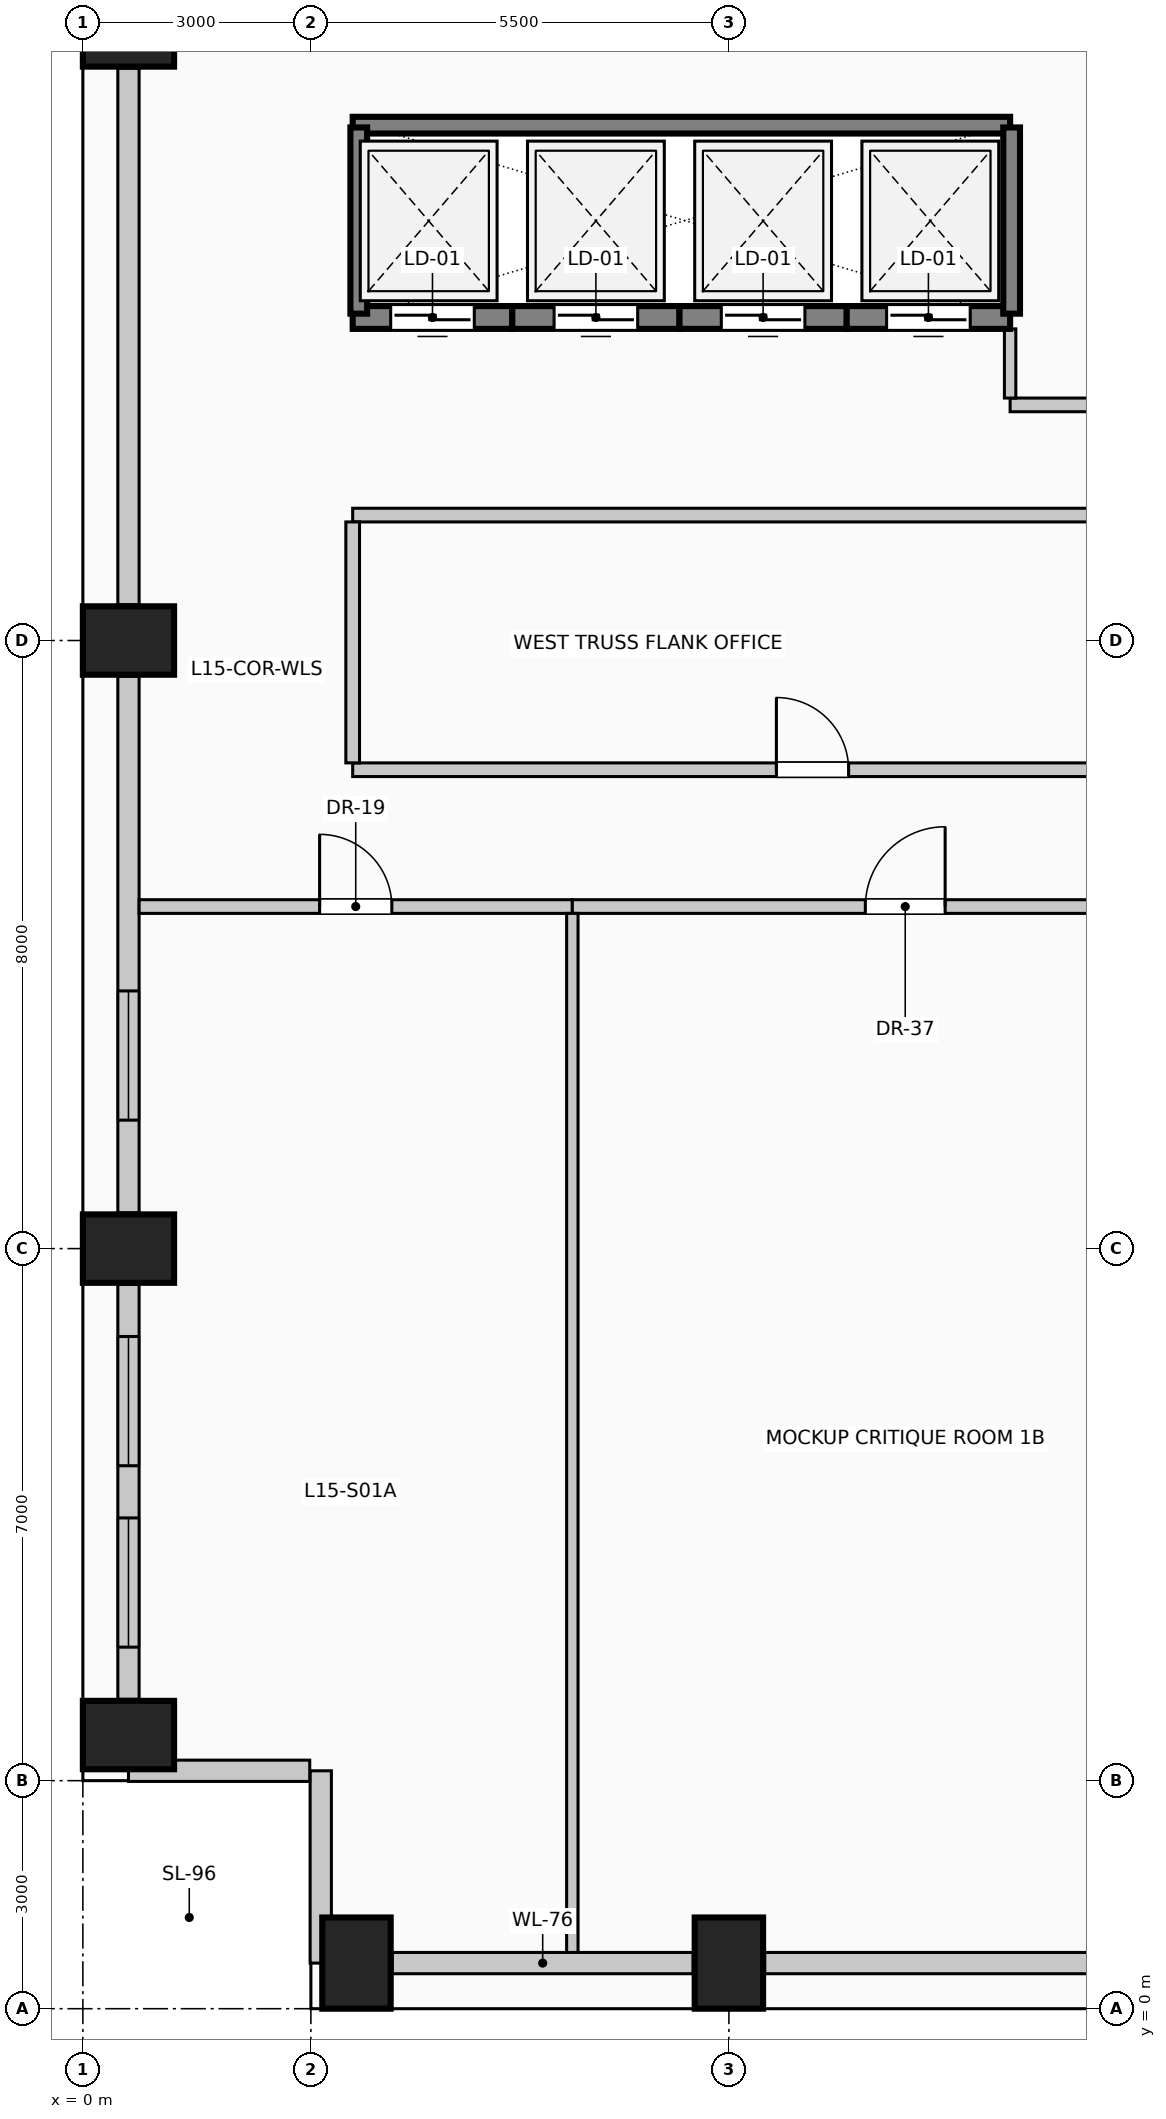
"""IFC4 building model, lengths in metres.
Left out: names, types, materials, properties, quantities, classifications, styles, units other than length and angle.
Written with IfcOpenShell. Run it as: python <this file> out.ifc"""

import sys

from ifc_helpers import new_model, si_unit, direction, frame, frame_2d, origin, origin_2d, place, context, subcontext, project, spatial, rectangle, extrude, element, fill, save


model = new_model("IFC4")
c1 = context("Model", 3, precision=1e-05, world=origin(), true_north=direction((0.0, 1.0)))
c2 = subcontext(c1, "Body", "Model", "MODEL_VIEW")
j1 = project(units=[si_unit("LENGTHUNIT", "METRE"), si_unit("PLANEANGLEUNIT", "RADIAN")], contexts=[c1])
p1 = place(None, origin())
s1 = spatial("IfcSite", under=j1, at=p1, CompositionType="ELEMENT")
p2 = place(p1, origin())
s2 = spatial("IfcBuilding", under=s1, at=p2, CompositionType="ELEMENT")
p3 = place(p2, frame((0.0, 0.0, 62.6)))
s3 = spatial("IfcBuildingStorey", under=s2, at=p3, CompositionType="ELEMENT", Elevation=62.6)
for number, where, z_axis, x_axis in (
    (1, (3.6, 0.6, 0.0), (0.0, 0.0, 1.0), (1.0, 0.0, 0.0)),
    (2, (8.5, 0.6, 0.0), (0.0, 0.0, 1.0), (1.0, 0.0, 0.0)),
    (3, (0.6, 3.6, 0.0), (0.0, 0.0, 1.0), (0.0, 1.0, 0.0)),
    (4, (0.6, 10.0, 0.0), (0.0, 0.0, 1.0), (0.0, 1.0, 0.0)),
    (5, (0.6, 18.0, 0.0), (0.0, 0.0, 1.0), (0.0, 1.0, 0.0)),
    (6, (0.6, 26.0, 0.0), (0.0, 0.0, 1.0), (0.0, 1.0, 0.0)),
):
    element("IfcColumn", number, at=place(p3, frame(where, z_axis=z_axis, x_axis=x_axis)), inside=s3, PredefinedType="COLUMN", context=c2, shape_type="SweptSolid", body=[
        extrude(rectangle(XDim=0.9, YDim=1.2, at=origin_2d()), origin(), (0.0, 0.0, 1.0), 4.0),
    ])
p4 = place(p3, frame((8.03, 0.6, 0.0), z_axis=(0.0, 0.0, 1.0), x_axis=(-1.0, 0.0, 0.0)))
e7 = element("IfcWall", 7, at=p4, inside=s3, PredefinedType="SOLIDWALL", context=c2, shape_type="SweptSolid", body=[
    extrude(rectangle(XDim=3.96, YDim=0.28, at=frame_2d((1.98, 0.0))), origin(), (0.0, 0.0, 1.0), 2.85),
])
p5 = place(p3, frame((13.53, 0.6, 0.0), z_axis=(0.0, 0.0, 1.0), x_axis=(-1.0, 0.0, 0.0)))
e8 = element("IfcWall", 8, at=p5, inside=s3, PredefinedType="SOLIDWALL", context=c2, shape_type="SweptSolid", body=[
    extrude(rectangle(XDim=4.56, YDim=0.28, at=frame_2d((2.28, 0.0))), origin(), (0.0, 0.0, 1.0), 2.85),
])
p6 = place(p3, frame((0.6, 4.07, 0.0), z_axis=(0.0, 0.0, 1.0), x_axis=(0.0, 1.0, 0.0)))
e9 = element("IfcWall", 9, at=p6, inside=s3, PredefinedType="SOLIDWALL", context=c2, shape_type="SweptSolid", body=[
    extrude(rectangle(XDim=5.46, YDim=0.28, at=frame_2d((2.73, 0.0))), origin(), (0.0, 0.0, 1.0), 2.85),
])
p7 = place(p6, frame((0.687, 0.0, 0.5)))
e10 = element("IfcOpeningElement", 10, at=p7, cuts=e9, PredefinedType="OPENING", context=c2, shape_type="SweptSolid", body=[
    extrude(rectangle(XDim=1.7, YDim=1.95, at=frame_2d((0.85, 0.975))), frame((0.0, 0.15, 0.0), z_axis=(0.0, -1.0, 0.0), x_axis=(1.0, 0.0, 0.0)), (0.0, 0.0, 1.0), 0.3),
])
p8 = place(p6, frame((3.073, 0.0, 0.5)))
e11 = element("IfcOpeningElement", 11, at=p8, cuts=e9, PredefinedType="OPENING", context=c2, shape_type="SweptSolid", body=[
    extrude(rectangle(XDim=1.7, YDim=1.95, at=frame_2d((0.85, 0.975))), frame((0.0, 0.15, 0.0), z_axis=(0.0, -1.0, 0.0), x_axis=(1.0, 0.0, 0.0)), (0.0, 0.0, 1.0), 0.3),
])
p9 = place(p3, frame((0.6, 10.47, 0.0), z_axis=(0.0, 0.0, 1.0), x_axis=(0.0, 1.0, 0.0)))
e12 = element("IfcWall", 12, at=p9, inside=s3, PredefinedType="SOLIDWALL", context=c2, shape_type="SweptSolid", body=[
    extrude(rectangle(XDim=7.06, YDim=0.28, at=frame_2d((3.53, 0.0))), origin(), (0.0, 0.0, 1.0), 2.85),
])
p10 = place(p9, frame((1.22, 0.0, 0.5)))
e13 = element("IfcOpeningElement", 13, at=p10, cuts=e12, PredefinedType="OPENING", context=c2, shape_type="SweptSolid", body=[
    extrude(rectangle(XDim=1.7, YDim=1.95, at=frame_2d((0.85, 0.975))), frame((0.0, 0.15, 0.0), z_axis=(0.0, -1.0, 0.0), x_axis=(1.0, 0.0, 0.0)), (0.0, 0.0, 1.0), 0.3),
])
p11 = place(p3, frame((0.6, 18.47, 0.0), z_axis=(0.0, 0.0, 1.0), x_axis=(0.0, 1.0, 0.0)))
e14 = element("IfcWall", 14, at=p11, inside=s3, PredefinedType="SOLIDWALL", context=c2, shape_type="SweptSolid", body=[
    extrude(rectangle(XDim=7.06, YDim=0.28, at=frame_2d((3.53, 0.0))), origin(), (0.0, 0.0, 1.0), 2.85),
])
p12 = place(p3, frame((3.13, 0.6, 0.0), z_axis=(0.0, 0.0, 1.0), x_axis=(0.0, 1.0, 0.0)))
e15 = element("IfcWall", 15, at=p12, inside=s3, PredefinedType="SOLIDWALL", context=c2, shape_type="SweptSolid", body=[
    extrude(rectangle(XDim=2.53, YDim=0.28, at=frame_2d((1.265, 0.0))), origin(), (0.0, 0.0, 1.0), 3.7),
])
p13 = place(p3, frame((2.985, 3.13, 0.0), z_axis=(0.0, 0.0, 1.0), x_axis=(-1.0, 0.0, 0.0)))
e16 = element("IfcWall", 16, at=p13, inside=s3, PredefinedType="SOLIDWALL", context=c2, shape_type="SweptSolid", body=[
    extrude(rectangle(XDim=2.385, YDim=0.28, at=frame_2d((1.192, 0.0))), origin(), (0.0, 0.0, 1.0), 3.7),
])
p14 = place(p3, frame((5.65, 22.25, 0.0), z_axis=(0.0, 0.0, 1.0), x_axis=(-1.0, 0.0, 0.0)))
e17 = element("IfcWall", 17, at=p14, inside=s3, PredefinedType="SOLIDWALL", context=c2, shape_type="SweptSolid", body=[
    extrude(rectangle(XDim=2.1, YDim=0.3, at=frame_2d((1.05, 0.0))), origin(), (0.0, 0.0, 1.0), 4.0),
])
p15 = place(p14, frame((0.5, 0.0, 0.0)))
e18 = element("IfcOpeningElement", 18, at=p15, cuts=e17, PredefinedType="OPENING", context=c2, shape_type="SweptSolid", body=[
    extrude(rectangle(XDim=1.1, YDim=2.2, at=frame_2d((0.55, 1.1))), frame((0.0, 0.16, 0.0), z_axis=(0.0, -1.0, 0.0), x_axis=(1.0, 0.0, 0.0)), (0.0, 0.0, 1.0), 0.32),
])
p16 = place(p3, frame((7.85, 22.25, 0.0), z_axis=(0.0, 0.0, 1.0), x_axis=(-1.0, 0.0, 0.0)))
e19 = element("IfcWall", 19, at=p16, inside=s3, PredefinedType="SOLIDWALL", context=c2, shape_type="SweptSolid", body=[
    extrude(rectangle(XDim=2.2, YDim=0.3, at=frame_2d((1.1, 0.0))), origin(), (0.0, 0.0, 1.0), 4.0),
])
p17 = place(p16, frame((0.55, 0.0, 0.0)))
e20 = element("IfcOpeningElement", 20, at=p17, cuts=e19, PredefinedType="OPENING", context=c2, shape_type="SweptSolid", body=[
    extrude(rectangle(XDim=1.1, YDim=2.2, at=frame_2d((0.55, 1.1))), frame((0.0, 0.16, 0.0), z_axis=(0.0, -1.0, 0.0), x_axis=(1.0, 0.0, 0.0)), (0.0, 0.0, 1.0), 0.32),
])
p18 = place(p3, frame((10.05, 22.25, 0.0), z_axis=(0.0, 0.0, 1.0), x_axis=(-1.0, 0.0, 0.0)))
e21 = element("IfcWall", 21, at=p18, inside=s3, PredefinedType="SOLIDWALL", context=c2, shape_type="SweptSolid", body=[
    extrude(rectangle(XDim=2.2, YDim=0.3, at=frame_2d((1.1, 0.0))), origin(), (0.0, 0.0, 1.0), 4.0),
])
p19 = place(p18, frame((0.55, 0.0, 0.0)))
e22 = element("IfcOpeningElement", 22, at=p19, cuts=e21, PredefinedType="OPENING", context=c2, shape_type="SweptSolid", body=[
    extrude(rectangle(XDim=1.1, YDim=2.2, at=frame_2d((0.55, 1.1))), frame((0.0, 0.16, 0.0), z_axis=(0.0, -1.0, 0.0), x_axis=(1.0, 0.0, 0.0)), (0.0, 0.0, 1.0), 0.32),
])
p20 = place(p3, frame((12.2, 22.25, 0.0), z_axis=(0.0, 0.0, 1.0), x_axis=(-1.0, 0.0, 0.0)))
e23 = element("IfcWall", 23, at=p20, inside=s3, PredefinedType="SOLIDWALL", context=c2, shape_type="SweptSolid", body=[
    extrude(rectangle(XDim=2.15, YDim=0.3, at=frame_2d((1.075, 0.0))), origin(), (0.0, 0.0, 1.0), 4.0),
])
p21 = place(p20, frame((0.525, 0.0, 0.0)))
e24 = element("IfcOpeningElement", 24, at=p21, cuts=e23, PredefinedType="OPENING", context=c2, shape_type="SweptSolid", body=[
    extrude(rectangle(XDim=1.1, YDim=2.2, at=frame_2d((0.55, 1.1))), frame((0.0, 0.16, 0.0), z_axis=(0.0, -1.0, 0.0), x_axis=(1.0, 0.0, 0.0)), (0.0, 0.0, 1.0), 0.32),
])
p22 = place(p3, frame((3.55, 24.78, 0.0), z_axis=(0.0, 0.0, 1.0), x_axis=(1.0, 0.0, 0.0)))
e25 = element("IfcWall", 25, at=p22, inside=s3, PredefinedType="SOLIDWALL", context=c2, shape_type="SweptSolid", body=[
    extrude(rectangle(XDim=8.65, YDim=0.22, at=frame_2d((4.325, 0.0))), origin(), (0.0, 0.0, 1.0), 4.0),
])
for number, where, z_axis, x_axis in (
    (26, (3.63, 22.3, 0.0), (0.0, 0.0, 1.0), (0.0, 1.0, 0.0)),
    (27, (12.22, 22.3, 0.0), (0.0, 0.0, 1.0), (0.0, 1.0, 0.0)),
):
    element("IfcWall", number, at=place(p3, frame(where, z_axis=z_axis, x_axis=x_axis)), inside=s3, PredefinedType="SOLIDWALL", context=c2, shape_type="SweptSolid", body=[
        extrude(rectangle(XDim=2.45, YDim=0.22, at=frame_2d((1.225, 0.0))), origin(), (0.0, 0.0, 1.0), 4.0),
    ])
p23 = place(p3, frame((0.74, 14.5, 0.0), z_axis=(0.0, 0.0, 1.0), x_axis=(1.0, 0.0, 0.0)))
e28 = element("IfcWall", 28, at=p23, inside=s3, PredefinedType="PARTITIONING", context=c2, shape_type="SweptSolid", body=[
    extrude(rectangle(XDim=5.7, YDim=0.18, at=frame_2d((2.85, 0.0))), origin(), (0.0, 0.0, 1.0), 3.7),
])
p24 = place(p23, frame((2.375, 0.0, 0.0)))
e29 = element("IfcOpeningElement", 29, at=p24, cuts=e28, PredefinedType="OPENING", context=c2, shape_type="SweptSolid", body=[
    extrude(rectangle(XDim=0.95, YDim=2.15, at=frame_2d((0.475, 1.075))), frame((0.0, 0.1, 0.0), z_axis=(0.0, -1.0, 0.0), x_axis=(1.0, 0.0, 0.0)), (0.0, 0.0, 1.0), 0.2),
])
p25 = place(p3, frame((6.44, 14.5, 0.0), z_axis=(0.0, 0.0, 1.0), x_axis=(1.0, 0.0, 0.0)))
e30 = element("IfcWall", 30, at=p25, inside=s3, PredefinedType="PARTITIONING", context=c2, shape_type="SweptSolid", body=[
    extrude(rectangle(XDim=8.76, YDim=0.18, at=frame_2d((4.38, 0.0))), origin(), (0.0, 0.0, 1.0), 3.7),
])
p26 = place(p25, frame((3.855, 0.0, 0.0)))
e31 = element("IfcOpeningElement", 31, at=p26, cuts=e30, PredefinedType="OPENING", context=c2, shape_type="SweptSolid", body=[
    extrude(rectangle(XDim=1.05, YDim=2.15, at=frame_2d((0.525, 1.075))), frame((0.0, 0.1, 0.0), z_axis=(0.0, -1.0, 0.0), x_axis=(1.0, 0.0, 0.0)), (0.0, 0.0, 1.0), 0.2),
])
p27 = place(p3, frame((3.55, 16.3, 0.0), z_axis=(0.0, 0.0, 1.0), x_axis=(1.0, 0.0, 0.0)))
e32 = element("IfcWall", 32, at=p27, inside=s3, PredefinedType="PARTITIONING", context=c2, shape_type="SweptSolid", body=[
    extrude(rectangle(XDim=12.1, YDim=0.18, at=frame_2d((6.05, 0.0))), origin(), (0.0, 0.0, 1.0), 3.7),
])
p28 = place(p27, frame((5.575, 0.0, 0.0)))
e33 = element("IfcOpeningElement", 33, at=p28, cuts=e32, PredefinedType="OPENING", context=c2, shape_type="SweptSolid", body=[
    extrude(rectangle(XDim=0.95, YDim=2.15, at=frame_2d((0.475, 1.075))), frame((0.0, 0.1, 0.0), z_axis=(0.0, -1.0, 0.0), x_axis=(1.0, 0.0, 0.0)), (0.0, 0.0, 1.0), 0.2),
])
p29 = place(p3, frame((3.55, 19.65, 0.0), z_axis=(0.0, 0.0, 1.0), x_axis=(1.0, 0.0, 0.0)))
e34 = element("IfcWall", 34, at=p29, inside=s3, PredefinedType="PARTITIONING", context=c2, shape_type="SweptSolid", body=[
    extrude(rectangle(XDim=12.1, YDim=0.18, at=frame_2d((6.05, 0.0))), origin(), (0.0, 0.0, 1.0), 3.7),
])
p30 = place(p3, frame((12.2, 21.1, 0.0), z_axis=(0.0, 0.0, 1.0), x_axis=(1.0, 0.0, 0.0)))
e35 = element("IfcWall", 35, at=p30, inside=s3, PredefinedType="PARTITIONING", context=c2, shape_type="SweptSolid", body=[
    extrude(rectangle(XDim=4.45, YDim=0.18, at=frame_2d((2.225, 0.0))), origin(), (0.0, 0.0, 1.0), 3.7),
])
p31 = place(p3, frame((3.55, 16.39, 0.0), z_axis=(0.0, 0.0, 1.0), x_axis=(0.0, 1.0, 0.0)))
e36 = element("IfcWall", 36, at=p31, inside=s3, PredefinedType="PARTITIONING", context=c2, shape_type="SweptSolid", body=[
    extrude(rectangle(XDim=3.17, YDim=0.18, at=frame_2d((1.585, 0.0))), origin(), (0.0, 0.0, 1.0), 3.7),
])
p32 = place(p3, frame((6.44, 0.74, 0.0), z_axis=(0.0, 0.0, 1.0), x_axis=(0.0, 1.0, 0.0)))
e37 = element("IfcWall", 37, at=p32, inside=s3, PredefinedType="PARTITIONING", context=c2, shape_type="SweptSolid", body=[
    extrude(rectangle(XDim=13.67, YDim=0.15, at=frame_2d((6.835, 0.0))), origin(), (0.0, 0.0, 1.0), 3.7),
])
p33 = place(p3, frame((12.2, 21.19, 0.0), z_axis=(0.0, 0.0, 1.0), x_axis=(0.0, 1.0, 0.0)))
e38 = element("IfcWall", 38, at=p33, inside=s3, PredefinedType="PARTITIONING", context=c2, shape_type="SweptSolid", body=[
    extrude(rectangle(XDim=0.91, YDim=0.15, at=frame_2d((0.455, 0.0))), origin(), (0.0, 0.0, 1.0), 3.7),
])
p34 = place(p7, origin())
e39 = element("IfcWindow", 39, at=p34, inside=s3, PartitioningType="SINGLE_PANEL", PredefinedType="WINDOW", context=c2, shape_type="SweptSolid", body=[
    extrude(rectangle(XDim=1.7, YDim=1.95, at=frame_2d((0.85, 0.975))), frame((0.0, 0.03, 0.0), z_axis=(0.0, -1.0, 0.0), x_axis=(1.0, 0.0, 0.0)), (0.0, 0.0, 1.0), 0.06),
])
fill(e10, e39)
p35 = place(p8, origin())
e40 = element("IfcWindow", 40, at=p35, inside=s3, PartitioningType="SINGLE_PANEL", PredefinedType="WINDOW", context=c2, shape_type="SweptSolid", body=[
    extrude(rectangle(XDim=1.7, YDim=1.95, at=frame_2d((0.85, 0.975))), frame((0.0, 0.03, 0.0), z_axis=(0.0, -1.0, 0.0), x_axis=(1.0, 0.0, 0.0)), (0.0, 0.0, 1.0), 0.06),
])
fill(e11, e40)
p36 = place(p10, origin())
e41 = element("IfcWindow", 41, at=p36, inside=s3, PartitioningType="SINGLE_PANEL", PredefinedType="WINDOW", context=c2, shape_type="SweptSolid", body=[
    extrude(rectangle(XDim=1.7, YDim=1.95, at=frame_2d((0.85, 0.975))), frame((0.0, 0.03, 0.0), z_axis=(0.0, -1.0, 0.0), x_axis=(1.0, 0.0, 0.0)), (0.0, 0.0, 1.0), 0.06),
])
fill(e13, e41)
p37 = place(p15, origin())
e42 = element("IfcDoor", 42, at=p37, inside=s3, OperationType="SLIDING_TO_LEFT", PredefinedType="DOOR", context=c2, shape_type="SweptSolid", body=[
    extrude(rectangle(XDim=1.1, YDim=2.2, at=frame_2d((0.55, 1.1))), frame((0.0, 0.025, 0.0), z_axis=(0.0, -1.0, 0.0), x_axis=(1.0, 0.0, 0.0)), (0.0, 0.0, 1.0), 0.05),
])
fill(e18, e42)
p38 = place(p17, origin())
e43 = element("IfcDoor", 43, at=p38, inside=s3, OperationType="SLIDING_TO_RIGHT", PredefinedType="DOOR", context=c2, shape_type="SweptSolid", body=[
    extrude(rectangle(XDim=1.1, YDim=2.2, at=frame_2d((0.55, 1.1))), frame((0.0, 0.025, 0.0), z_axis=(0.0, -1.0, 0.0), x_axis=(1.0, 0.0, 0.0)), (0.0, 0.0, 1.0), 0.05),
])
fill(e20, e43)
p39 = place(p19, origin())
e44 = element("IfcDoor", 44, at=p39, inside=s3, OperationType="SLIDING_TO_LEFT", PredefinedType="DOOR", context=c2, shape_type="SweptSolid", body=[
    extrude(rectangle(XDim=1.1, YDim=2.2, at=frame_2d((0.55, 1.1))), frame((0.0, 0.025, 0.0), z_axis=(0.0, -1.0, 0.0), x_axis=(1.0, 0.0, 0.0)), (0.0, 0.0, 1.0), 0.05),
])
fill(e22, e44)
p40 = place(p21, origin())
e45 = element("IfcDoor", 45, at=p40, inside=s3, OperationType="SLIDING_TO_RIGHT", PredefinedType="DOOR", context=c2, shape_type="SweptSolid", body=[
    extrude(rectangle(XDim=1.1, YDim=2.2, at=frame_2d((0.55, 1.1))), frame((0.0, 0.025, 0.0), z_axis=(0.0, -1.0, 0.0), x_axis=(1.0, 0.0, 0.0)), (0.0, 0.0, 1.0), 0.05),
])
fill(e24, e45)
p41 = place(p24, origin())
e46 = element("IfcDoor", 46, at=p41, inside=s3, OperationType="SINGLE_SWING_LEFT", PredefinedType="DOOR", context=c2, shape_type="SweptSolid", body=[
    extrude(rectangle(XDim=0.95, YDim=2.15, at=frame_2d((0.475, 1.075))), frame((0.0, 0.025, 0.0), z_axis=(0.0, -1.0, 0.0), x_axis=(1.0, 0.0, 0.0)), (0.0, 0.0, 1.0), 0.05),
])
fill(e29, e46)
p42 = place(p26, origin())
e47 = element("IfcDoor", 47, at=p42, inside=s3, OperationType="SINGLE_SWING_RIGHT", PredefinedType="DOOR", context=c2, shape_type="SweptSolid", body=[
    extrude(rectangle(XDim=1.05, YDim=2.15, at=frame_2d((0.525, 1.075))), frame((0.0, 0.025, 0.0), z_axis=(0.0, -1.0, 0.0), x_axis=(1.0, 0.0, 0.0)), (0.0, 0.0, 1.0), 0.05),
])
fill(e31, e47)
p43 = place(p28, origin())
e48 = element("IfcDoor", 48, at=p43, inside=s3, OperationType="SINGLE_SWING_LEFT", PredefinedType="DOOR", context=c2, shape_type="SweptSolid", body=[
    extrude(rectangle(XDim=0.95, YDim=2.15, at=frame_2d((0.475, 1.075))), frame((0.0, 0.025, 0.0), z_axis=(0.0, -1.0, 0.0), x_axis=(1.0, 0.0, 0.0)), (0.0, 0.0, 1.0), 0.05),
])
fill(e33, e48)
save(model, sys.argv[1])
